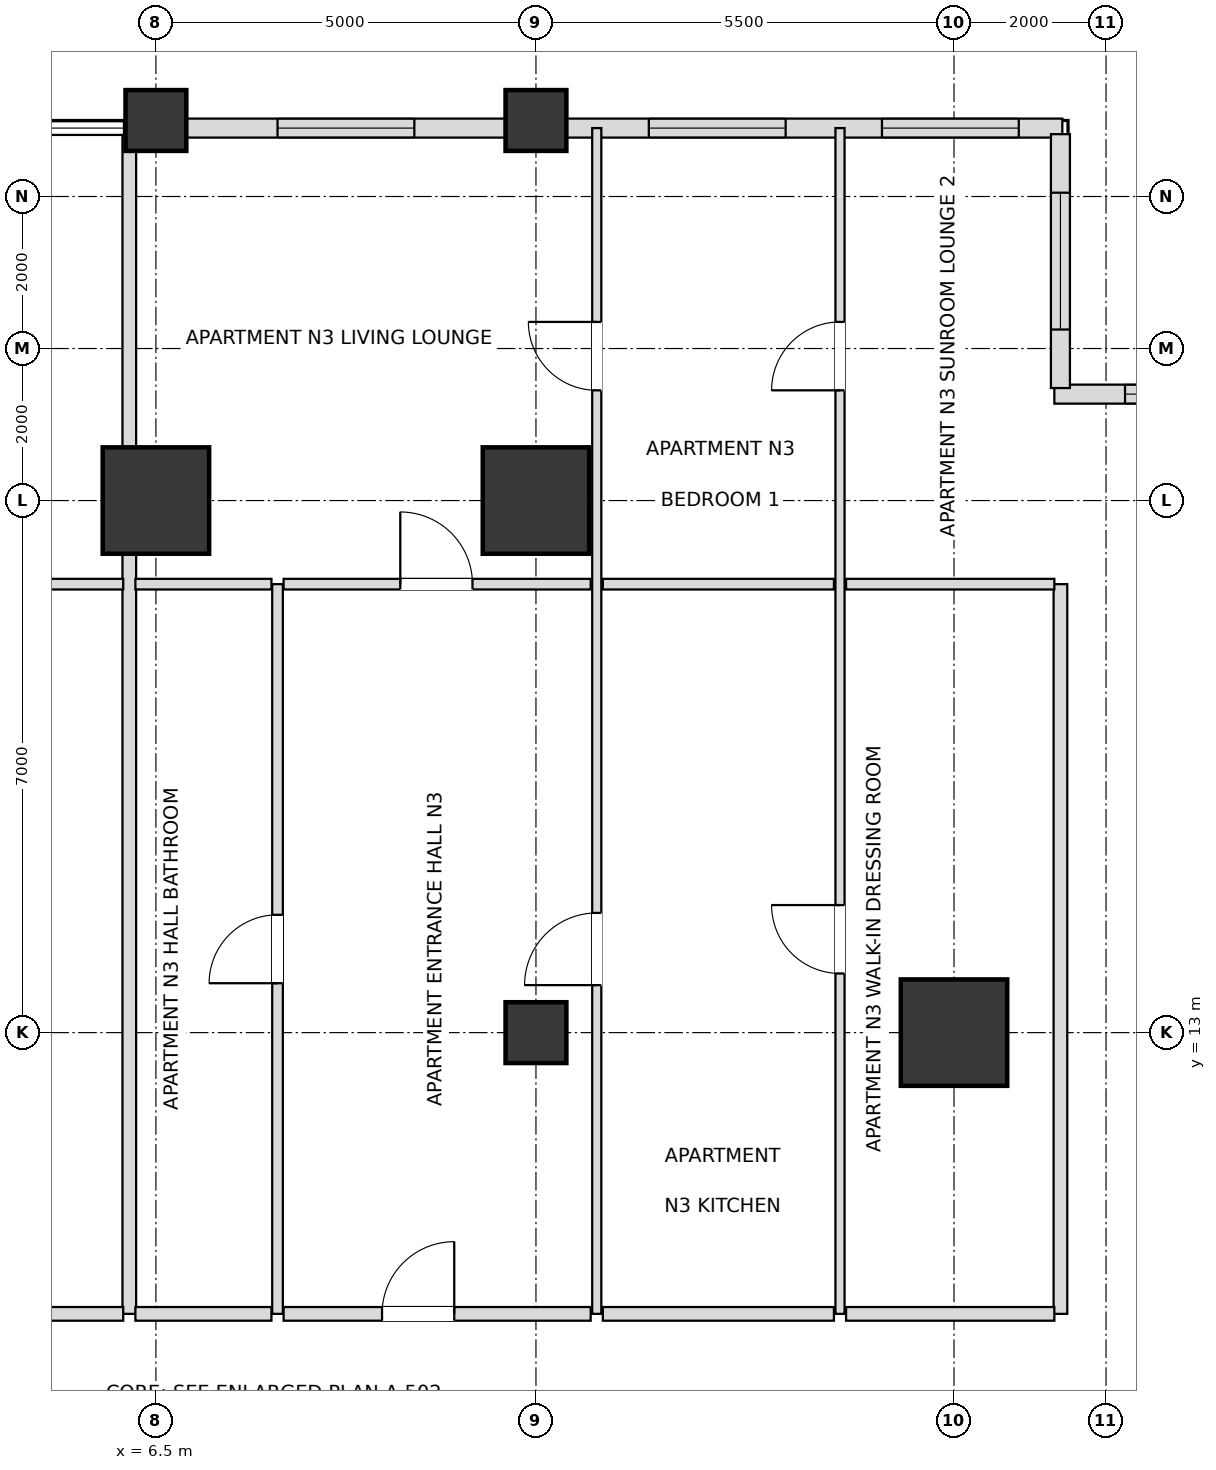
"""IFC4 building model, lengths in metres.
Left out: names, types, materials, properties, quantities, classifications, styles, units other than length and angle.
Written with IfcOpenShell. Run it as: python <this file> out.ifc"""

import sys

from ifc_helpers import new_model, si_unit, direction, frame, frame_2d, origin, origin_2d, place, context, subcontext, project, spatial, rectangle, extrude, element, fill, save


model = new_model("IFC4")
c1 = context("Model", 3, precision=1e-05, world=origin(), true_north=direction((0.0, 1.0)))
c2 = subcontext(c1, "Body", "Model", "MODEL_VIEW")
j1 = project(units=[si_unit("LENGTHUNIT", "METRE"), si_unit("PLANEANGLEUNIT", "RADIAN")], contexts=[c1])
p1 = place(None, origin())
s1 = spatial("IfcSite", under=j1, at=p1, CompositionType="ELEMENT")
p2 = place(p1, origin())
s2 = spatial("IfcBuilding", under=s1, at=p2, CompositionType="ELEMENT")
p3 = place(p2, frame((0.0, 0.0, 43.2)))
s3 = spatial("IfcBuildingStorey", under=s2, at=p3, CompositionType="ELEMENT", Elevation=43.2)
for number, where, z_axis, x_axis in (
    (1, (17.0, 13.0, 0.0), (0.0, 0.0, 1.0), (1.0, 0.0, 0.0)),
    (2, (11.5, 20.0, 0.0), (0.0, 0.0, 1.0), (1.0, 0.0, 0.0)),
    (3, (6.5, 20.0, 0.0), (0.0, 0.0, 1.0), (1.0, 0.0, 0.0)),
):
    element("IfcColumn", number, at=place(p3, frame(where, z_axis=z_axis, x_axis=x_axis)), inside=s3, PredefinedType="USERDEFINED", context=c2, shape_type="SweptSolid", body=[
        extrude(rectangle(XDim=1.4, YDim=1.4, at=origin_2d()), origin(), (0.0, 0.0, 1.0), 3.6),
    ])
for number, where, z_axis, x_axis in (
    (4, (11.5, 13.0, 0.0), (0.0, 0.0, 1.0), (1.0, 0.0, 0.0)),
    (5, (6.5, 25.0, 0.0), (0.0, 0.0, 1.0), (1.0, 0.0, 0.0)),
    (6, (11.5, 25.0, 0.0), (0.0, 0.0, 1.0), (1.0, 0.0, 0.0)),
):
    element("IfcColumn", number, at=place(p3, frame(where, z_axis=z_axis, x_axis=x_axis)), inside=s3, PredefinedType="COLUMN", context=c2, shape_type="SweptSolid", body=[
        extrude(rectangle(XDim=0.8, YDim=0.8, at=origin_2d()), origin(), (0.0, 0.0, 1.0), 3.6),
    ])
p4 = place(p3, frame((18.425, 24.9, 0.0), z_axis=(0.0, 0.0, 1.0), x_axis=(-1.0, 0.0, 0.0)))
e7 = element("IfcWall", 7, at=p4, inside=s3, PredefinedType="SOLIDWALL", context=c2, shape_type="SweptSolid", body=[
    extrude(rectangle(XDim=6.53, YDim=0.25, at=frame_2d((3.265, 0.0))), origin(), (0.0, 0.0, 1.0), 2.736),
])
p5 = place(p4, frame((0.573, 0.0, 0.72)))
e8 = element("IfcOpeningElement", 8, at=p5, cuts=e7, PredefinedType="OPENING", context=c2, shape_type="SweptSolid", body=[
    extrude(rectangle(XDim=1.8, YDim=1.68, at=frame_2d((0.9, 0.84))), frame((0.0, 0.135, 0.0), z_axis=(0.0, -1.0, 0.0), x_axis=(1.0, 0.0, 0.0)), (0.0, 0.0, 1.0), 0.27),
])
p6 = place(p4, frame((3.64, 0.0, 0.72)))
e9 = element("IfcOpeningElement", 9, at=p6, cuts=e7, PredefinedType="OPENING", context=c2, shape_type="SweptSolid", body=[
    extrude(rectangle(XDim=1.8, YDim=1.68, at=frame_2d((0.9, 0.84))), frame((0.0, 0.135, 0.0), z_axis=(0.0, -1.0, 0.0), x_axis=(1.0, 0.0, 0.0)), (0.0, 0.0, 1.0), 0.27),
])
p7 = place(p3, frame((11.105, 24.9, 0.0), z_axis=(0.0, 0.0, 1.0), x_axis=(-1.0, 0.0, 0.0)))
e10 = element("IfcWall", 10, at=p7, inside=s3, PredefinedType="SOLIDWALL", context=c2, shape_type="SweptSolid", body=[
    extrude(rectangle(XDim=4.21, YDim=0.25, at=frame_2d((2.105, 0.0))), origin(), (0.0, 0.0, 1.0), 2.736),
])
p8 = place(p7, frame((1.205, 0.0, 0.72)))
e11 = element("IfcOpeningElement", 11, at=p8, cuts=e10, PredefinedType="OPENING", context=c2, shape_type="SweptSolid", body=[
    extrude(rectangle(XDim=1.8, YDim=1.68, at=frame_2d((0.9, 0.84))), frame((0.0, 0.135, 0.0), z_axis=(0.0, -1.0, 0.0), x_axis=(1.0, 0.0, 0.0)), (0.0, 0.0, 1.0), 0.27),
])
p9 = place(p3, frame((21.98, 21.4, 0.0), z_axis=(0.0, 0.0, 1.0), x_axis=(-1.0, 0.0, 0.0)))
e12 = element("IfcWall", 12, at=p9, inside=s3, PredefinedType="SOLIDWALL", context=c2, shape_type="SweptSolid", body=[
    extrude(rectangle(XDim=3.66, YDim=0.25, at=frame_2d((1.83, 0.0))), origin(), (0.0, 0.0, 1.0), 2.736),
])
p10 = place(p9, frame((0.93, 0.0, 0.72)))
e13 = element("IfcOpeningElement", 13, at=p10, cuts=e12, PredefinedType="OPENING", context=c2, shape_type="SweptSolid", body=[
    extrude(rectangle(XDim=1.8, YDim=1.68, at=frame_2d((0.9, 0.84))), frame((0.0, 0.135, 0.0), z_axis=(0.0, -1.0, 0.0), x_axis=(1.0, 0.0, 0.0)), (0.0, 0.0, 1.0), 0.27),
])
p11 = place(p3, frame((18.4, 21.48, 0.0), z_axis=(0.0, 0.0, 1.0), x_axis=(0.0, 1.0, 0.0)))
e14 = element("IfcWall", 14, at=p11, inside=s3, PredefinedType="SOLIDWALL", context=c2, shape_type="SweptSolid", body=[
    extrude(rectangle(XDim=3.34, YDim=0.25, at=frame_2d((1.67, 0.0))), origin(), (0.0, 0.0, 1.0), 2.736),
])
p12 = place(p11, frame((0.77, 0.0, 0.72)))
e15 = element("IfcOpeningElement", 15, at=p12, cuts=e14, PredefinedType="OPENING", context=c2, shape_type="SweptSolid", body=[
    extrude(rectangle(XDim=1.8, YDim=1.68, at=frame_2d((0.9, 0.84))), frame((0.0, 0.135, 0.0), z_axis=(0.0, -1.0, 0.0), x_axis=(1.0, 0.0, 0.0)), (0.0, 0.0, 1.0), 0.27),
])
p13 = place(p3, frame((6.15, 9.3, 0.0), z_axis=(0.0, 0.0, 1.0), x_axis=(0.0, 1.0, 0.0)))
e16 = element("IfcWall", 16, at=p13, inside=s3, PredefinedType="PARTITIONING", context=c2, shape_type="SweptSolid", body=[
    extrude(rectangle(XDim=15.6, YDim=0.18, at=frame_2d((7.8, 0.0))), origin(), (0.0, 0.0, 1.0), 2.816),
])
p14 = place(p3, frame((8.1, 9.3, 0.0), z_axis=(0.0, 0.0, 1.0), x_axis=(0.0, 1.0, 0.0)))
e17 = element("IfcWall", 17, at=p14, inside=s3, PredefinedType="PARTITIONING", context=c2, shape_type="SweptSolid", body=[
    extrude(rectangle(XDim=9.6, YDim=0.14, at=frame_2d((4.8, 0.0))), origin(), (0.0, 0.0, 1.0), 2.816),
])
p15 = place(p14, frame((4.35, 0.0, 0.0)))
e18 = element("IfcOpeningElement", 18, at=p15, cuts=e17, PredefinedType="OPENING", context=c2, shape_type="SweptSolid", body=[
    extrude(rectangle(XDim=0.9, YDim=2.1, at=frame_2d((0.45, 1.05))), frame((0.0, 0.08, 0.0), z_axis=(0.0, -1.0, 0.0), x_axis=(1.0, 0.0, 0.0)), (0.0, 0.0, 1.0), 0.16),
])
p16 = place(p3, frame((12.3, 9.3, 0.0), z_axis=(0.0, 0.0, 1.0), x_axis=(0.0, 1.0, 0.0)))
e19 = element("IfcWall", 19, at=p16, inside=s3, PredefinedType="PARTITIONING", context=c2, shape_type="SweptSolid", body=[
    extrude(rectangle(XDim=15.6, YDim=0.12, at=frame_2d((7.8, 0.0))), origin(), (0.0, 0.0, 1.0), 2.736),
])
p17 = place(p16, frame((4.325, 0.0, 0.0)))
e20 = element("IfcOpeningElement", 20, at=p17, cuts=e19, PredefinedType="OPENING", context=c2, shape_type="SweptSolid", body=[
    extrude(rectangle(XDim=0.95, YDim=2.1, at=frame_2d((0.475, 1.05))), frame((0.0, 0.07, 0.0), z_axis=(0.0, -1.0, 0.0), x_axis=(1.0, 0.0, 0.0)), (0.0, 0.0, 1.0), 0.14),
])
p18 = place(p16, frame((12.15, 0.0, 0.0)))
e21 = element("IfcOpeningElement", 21, at=p18, cuts=e19, PredefinedType="OPENING", context=c2, shape_type="SweptSolid", body=[
    extrude(rectangle(XDim=0.9, YDim=2.1, at=frame_2d((0.45, 1.05))), frame((0.0, 0.07, 0.0), z_axis=(0.0, -1.0, 0.0), x_axis=(1.0, 0.0, 0.0)), (0.0, 0.0, 1.0), 0.14),
])
p19 = place(p3, frame((15.5, 9.3, 0.0), z_axis=(0.0, 0.0, 1.0), x_axis=(0.0, 1.0, 0.0)))
e22 = element("IfcWall", 22, at=p19, inside=s3, PredefinedType="PARTITIONING", context=c2, shape_type="SweptSolid", body=[
    extrude(rectangle(XDim=15.6, YDim=0.12, at=frame_2d((7.8, 0.0))), origin(), (0.0, 0.0, 1.0), 2.736),
])
p20 = place(p19, frame((4.478, 0.0, 0.0)))
e23 = element("IfcOpeningElement", 23, at=p20, cuts=e22, PredefinedType="OPENING", context=c2, shape_type="SweptSolid", body=[
    extrude(rectangle(XDim=0.9, YDim=2.1, at=frame_2d((0.45, 1.05))), frame((0.0, 0.07, 0.0), z_axis=(0.0, -1.0, 0.0), x_axis=(1.0, 0.0, 0.0)), (0.0, 0.0, 1.0), 0.14),
])
p21 = place(p19, frame((12.15, 0.0, 0.0)))
e24 = element("IfcOpeningElement", 24, at=p21, cuts=e22, PredefinedType="OPENING", context=c2, shape_type="SweptSolid", body=[
    extrude(rectangle(XDim=0.9, YDim=2.1, at=frame_2d((0.45, 1.05))), frame((0.0, 0.07, 0.0), z_axis=(0.0, -1.0, 0.0), x_axis=(1.0, 0.0, 0.0)), (0.0, 0.0, 1.0), 0.14),
])
p22 = place(p3, frame((18.4, 9.3, 0.0), z_axis=(0.0, 0.0, 1.0), x_axis=(0.0, 1.0, 0.0)))
e25 = element("IfcWall", 25, at=p22, inside=s3, PredefinedType="PARTITIONING", context=c2, shape_type="SweptSolid", body=[
    extrude(rectangle(XDim=9.6, YDim=0.18, at=frame_2d((4.8, 0.0))), origin(), (0.0, 0.0, 1.0), 2.736),
])
p23 = place(p3, frame((3.28, 9.3, 0.0), z_axis=(0.0, 0.0, 1.0), x_axis=(1.0, 0.0, 0.0)))
e26 = element("IfcWall", 26, at=p23, inside=s3, PredefinedType="PARTITIONING", context=c2, shape_type="SweptSolid", body=[
    extrude(rectangle(XDim=2.79, YDim=0.18, at=frame_2d((1.395, 0.0))), origin(), (0.0, 0.0, 1.0), 3.38),
])
p24 = place(p3, frame((6.23, 9.3, 0.0), z_axis=(0.0, 0.0, 1.0), x_axis=(1.0, 0.0, 0.0)))
e27 = element("IfcWall", 27, at=p24, inside=s3, PredefinedType="PARTITIONING", context=c2, shape_type="SweptSolid", body=[
    extrude(rectangle(XDim=1.79, YDim=0.18, at=frame_2d((0.895, 0.0))), origin(), (0.0, 0.0, 1.0), 2.816),
])
p25 = place(p3, frame((8.18, 9.3, 0.0), z_axis=(0.0, 0.0, 1.0), x_axis=(1.0, 0.0, 0.0)))
e28 = element("IfcWall", 28, at=p25, inside=s3, PredefinedType="PARTITIONING", context=c2, shape_type="SweptSolid", body=[
    extrude(rectangle(XDim=4.04, YDim=0.18, at=frame_2d((2.02, 0.0))), origin(), (0.0, 0.0, 1.0), 3.38),
])
p26 = place(p25, frame((1.295, 0.0, 0.0)))
e29 = element("IfcOpeningElement", 29, at=p26, cuts=e28, PredefinedType="OPENING", context=c2, shape_type="SweptSolid", body=[
    extrude(rectangle(XDim=0.95, YDim=2.15, at=frame_2d((0.475, 1.075))), frame((0.0, 0.1, 0.0), z_axis=(0.0, -1.0, 0.0), x_axis=(1.0, 0.0, 0.0)), (0.0, 0.0, 1.0), 0.2),
])
p27 = place(p3, frame((12.38, 9.3, 0.0), z_axis=(0.0, 0.0, 1.0), x_axis=(1.0, 0.0, 0.0)))
e30 = element("IfcWall", 30, at=p27, inside=s3, PredefinedType="PARTITIONING", context=c2, shape_type="SweptSolid", body=[
    extrude(rectangle(XDim=3.04, YDim=0.18, at=frame_2d((1.52, 0.0))), origin(), (0.0, 0.0, 1.0), 3.38),
])
p28 = place(p3, frame((15.58, 9.3, 0.0), z_axis=(0.0, 0.0, 1.0), x_axis=(1.0, 0.0, 0.0)))
e31 = element("IfcWall", 31, at=p28, inside=s3, PredefinedType="PARTITIONING", context=c2, shape_type="SweptSolid", body=[
    extrude(rectangle(XDim=2.74, YDim=0.18, at=frame_2d((1.37, 0.0))), origin(), (0.0, 0.0, 1.0), 2.816),
])
p29 = place(p3, frame((3.28, 18.9, 0.0), z_axis=(0.0, 0.0, 1.0), x_axis=(1.0, 0.0, 0.0)))
e32 = element("IfcWall", 32, at=p29, inside=s3, PredefinedType="PARTITIONING", context=c2, shape_type="SweptSolid", body=[
    extrude(rectangle(XDim=2.79, YDim=0.14, at=frame_2d((1.395, 0.0))), origin(), (0.0, 0.0, 1.0), 3.38),
])
p30 = place(p3, frame((6.23, 18.9, 0.0), z_axis=(0.0, 0.0, 1.0), x_axis=(1.0, 0.0, 0.0)))
e33 = element("IfcWall", 33, at=p30, inside=s3, PredefinedType="PARTITIONING", context=c2, shape_type="SweptSolid", body=[
    extrude(rectangle(XDim=1.79, YDim=0.14, at=frame_2d((0.895, 0.0))), origin(), (0.0, 0.0, 1.0), 2.816),
])
p31 = place(p3, frame((8.18, 18.9, 0.0), z_axis=(0.0, 0.0, 1.0), x_axis=(1.0, 0.0, 0.0)))
e34 = element("IfcWall", 34, at=p31, inside=s3, PredefinedType="PARTITIONING", context=c2, shape_type="SweptSolid", body=[
    extrude(rectangle(XDim=4.04, YDim=0.14, at=frame_2d((2.02, 0.0))), origin(), (0.0, 0.0, 1.0), 2.736),
])
p32 = place(p31, frame((1.535, 0.0, 0.0)))
e35 = element("IfcOpeningElement", 35, at=p32, cuts=e34, PredefinedType="OPENING", context=c2, shape_type="SweptSolid", body=[
    extrude(rectangle(XDim=0.95, YDim=2.1, at=frame_2d((0.475, 1.05))), frame((0.0, 0.08, 0.0), z_axis=(0.0, -1.0, 0.0), x_axis=(1.0, 0.0, 0.0)), (0.0, 0.0, 1.0), 0.16),
])
p33 = place(p3, frame((12.38, 18.9, 0.0), z_axis=(0.0, 0.0, 1.0), x_axis=(1.0, 0.0, 0.0)))
e36 = element("IfcWall", 36, at=p33, inside=s3, PredefinedType="PARTITIONING", context=c2, shape_type="SweptSolid", body=[
    extrude(rectangle(XDim=3.04, YDim=0.14, at=frame_2d((1.52, 0.0))), origin(), (0.0, 0.0, 1.0), 2.736),
])
p34 = place(p3, frame((15.58, 18.9, 0.0), z_axis=(0.0, 0.0, 1.0), x_axis=(1.0, 0.0, 0.0)))
e37 = element("IfcWall", 37, at=p34, inside=s3, PredefinedType="PARTITIONING", context=c2, shape_type="SweptSolid", body=[
    extrude(rectangle(XDim=2.74, YDim=0.14, at=frame_2d((1.37, 0.0))), origin(), (0.0, 0.0, 1.0), 2.736),
])
p35 = place(p5, origin())
e38 = element("IfcWindow", 38, at=p35, inside=s3, PartitioningType="SINGLE_PANEL", PredefinedType="WINDOW", context=c2, shape_type="SweptSolid", body=[
    extrude(rectangle(XDim=1.8, YDim=1.68, at=frame_2d((0.9, 0.84))), frame((0.0, 0.03, 0.0), z_axis=(0.0, -1.0, 0.0), x_axis=(1.0, 0.0, 0.0)), (0.0, 0.0, 1.0), 0.06),
])
fill(e8, e38)
p36 = place(p6, origin())
e39 = element("IfcWindow", 39, at=p36, inside=s3, PartitioningType="SINGLE_PANEL", PredefinedType="WINDOW", context=c2, shape_type="SweptSolid", body=[
    extrude(rectangle(XDim=1.8, YDim=1.68, at=frame_2d((0.9, 0.84))), frame((0.0, 0.03, 0.0), z_axis=(0.0, -1.0, 0.0), x_axis=(1.0, 0.0, 0.0)), (0.0, 0.0, 1.0), 0.06),
])
fill(e9, e39)
p37 = place(p8, origin())
e40 = element("IfcWindow", 40, at=p37, inside=s3, PartitioningType="SINGLE_PANEL", PredefinedType="WINDOW", context=c2, shape_type="SweptSolid", body=[
    extrude(rectangle(XDim=1.8, YDim=1.68, at=frame_2d((0.9, 0.84))), frame((0.0, 0.03, 0.0), z_axis=(0.0, -1.0, 0.0), x_axis=(1.0, 0.0, 0.0)), (0.0, 0.0, 1.0), 0.06),
])
fill(e11, e40)
p38 = place(p10, origin())
e41 = element("IfcWindow", 41, at=p38, inside=s3, PartitioningType="SINGLE_PANEL", PredefinedType="WINDOW", context=c2, shape_type="SweptSolid", body=[
    extrude(rectangle(XDim=1.8, YDim=1.68, at=frame_2d((0.9, 0.84))), frame((0.0, 0.03, 0.0), z_axis=(0.0, -1.0, 0.0), x_axis=(1.0, 0.0, 0.0)), (0.0, 0.0, 1.0), 0.06),
])
fill(e13, e41)
p39 = place(p12, origin())
e42 = element("IfcWindow", 42, at=p39, inside=s3, PartitioningType="SINGLE_PANEL", PredefinedType="WINDOW", context=c2, shape_type="SweptSolid", body=[
    extrude(rectangle(XDim=1.8, YDim=1.68, at=frame_2d((0.9, 0.84))), frame((0.0, 0.03, 0.0), z_axis=(0.0, -1.0, 0.0), x_axis=(1.0, 0.0, 0.0)), (0.0, 0.0, 1.0), 0.06),
])
fill(e15, e42)
p40 = place(p15, origin())
e43 = element("IfcDoor", 43, at=p40, inside=s3, OperationType="SINGLE_SWING_LEFT", PredefinedType="DOOR", context=c2, shape_type="SweptSolid", body=[
    extrude(rectangle(XDim=0.9, YDim=2.1, at=frame_2d((0.45, 1.05))), frame((0.0, 0.025, 0.0), z_axis=(0.0, -1.0, 0.0), x_axis=(1.0, 0.0, 0.0)), (0.0, 0.0, 1.0), 0.05),
])
fill(e18, e43)
p41 = place(p26, origin())
e44 = element("IfcDoor", 44, at=p41, inside=s3, OperationType="SINGLE_SWING_RIGHT", PredefinedType="DOOR", context=c2, shape_type="SweptSolid", body=[
    extrude(rectangle(XDim=0.95, YDim=2.15, at=frame_2d((0.475, 1.075))), frame((0.0, 0.025, 0.0), z_axis=(0.0, -1.0, 0.0), x_axis=(1.0, 0.0, 0.0)), (0.0, 0.0, 1.0), 0.05),
])
fill(e29, e44)
p42 = place(p17, origin())
e45 = element("IfcDoor", 45, at=p42, inside=s3, OperationType="SINGLE_SWING_LEFT", PredefinedType="DOOR", context=c2, shape_type="SweptSolid", body=[
    extrude(rectangle(XDim=0.95, YDim=2.1, at=frame_2d((0.475, 1.05))), frame((0.0, 0.025, 0.0), z_axis=(0.0, -1.0, 0.0), x_axis=(1.0, 0.0, 0.0)), (0.0, 0.0, 1.0), 0.05),
])
fill(e20, e45)
p43 = place(p20, origin())
e46 = element("IfcDoor", 46, at=p43, inside=s3, OperationType="SINGLE_SWING_RIGHT", PredefinedType="DOOR", context=c2, shape_type="SweptSolid", body=[
    extrude(rectangle(XDim=0.9, YDim=2.1, at=frame_2d((0.45, 1.05))), frame((0.0, 0.025, 0.0), z_axis=(0.0, -1.0, 0.0), x_axis=(1.0, 0.0, 0.0)), (0.0, 0.0, 1.0), 0.05),
])
fill(e23, e46)
p44 = place(p32, origin())
e47 = element("IfcDoor", 47, at=p44, inside=s3, OperationType="SINGLE_SWING_LEFT", PredefinedType="DOOR", context=c2, shape_type="SweptSolid", body=[
    extrude(rectangle(XDim=0.95, YDim=2.1, at=frame_2d((0.475, 1.05))), frame((0.0, 0.025, 0.0), z_axis=(0.0, -1.0, 0.0), x_axis=(1.0, 0.0, 0.0)), (0.0, 0.0, 1.0), 0.05),
])
fill(e35, e47)
p45 = place(p18, origin())
e48 = element("IfcDoor", 48, at=p45, inside=s3, OperationType="SINGLE_SWING_RIGHT", PredefinedType="DOOR", context=c2, shape_type="SweptSolid", body=[
    extrude(rectangle(XDim=0.9, YDim=2.1, at=frame_2d((0.45, 1.05))), frame((0.0, 0.025, 0.0), z_axis=(0.0, -1.0, 0.0), x_axis=(1.0, 0.0, 0.0)), (0.0, 0.0, 1.0), 0.05),
])
fill(e21, e48)
p46 = place(p21, origin())
e49 = element("IfcDoor", 49, at=p46, inside=s3, OperationType="SINGLE_SWING_LEFT", PredefinedType="DOOR", context=c2, shape_type="SweptSolid", body=[
    extrude(rectangle(XDim=0.9, YDim=2.1, at=frame_2d((0.45, 1.05))), frame((0.0, 0.025, 0.0), z_axis=(0.0, -1.0, 0.0), x_axis=(1.0, 0.0, 0.0)), (0.0, 0.0, 1.0), 0.05),
])
fill(e24, e49)
save(model, sys.argv[1])
